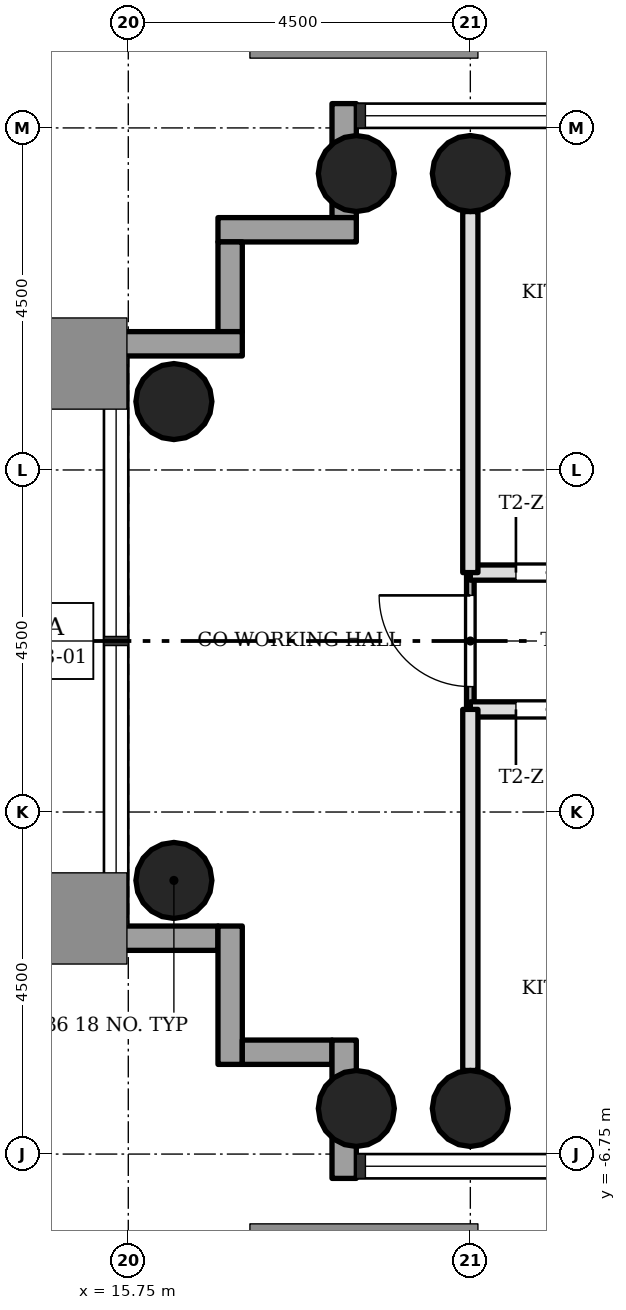
"""IFC4 building model, lengths in metres.
Left out: names, types, materials, properties, quantities, classifications, styles, units other than length and angle.
Written with IfcOpenShell. Run it as: python <this file> out.ifc"""

import sys

from ifc_helpers import new_model, si_unit, direction, frame, frame_2d, origin, origin_2d, place, context, subcontext, project, spatial, rectangle, hollow_circle, extrude, element, fill, save


model = new_model("IFC4")
c1 = context("Model", 3, precision=1e-05, world=origin(), true_north=direction((0.0, 1.0)))
c2 = subcontext(c1, "Body", "Model", "MODEL_VIEW")
j1 = project(units=[si_unit("LENGTHUNIT", "METRE"), si_unit("PLANEANGLEUNIT", "RADIAN")], contexts=[c1])
p1 = place(None, origin())
s1 = spatial("IfcSite", under=j1, at=p1, CompositionType="ELEMENT")
p2 = place(p1, origin())
s2 = spatial("IfcBuilding", under=s1, at=p2, CompositionType="ELEMENT")
p3 = place(p2, frame((0.0, 0.0, 38.1)))
s3 = spatial("IfcBuildingStorey", under=s2, at=p3, CompositionType="ELEMENT", Elevation=38.1)
for number, where, z_axis, x_axis in (
    (1, (20.25, 6.15, 0.0), (0.0, 0.0, 1.0), (1.0, 0.0, 0.0)),
    (2, (20.25, -6.15, 0.0), (0.0, 0.0, 1.0), (1.0, 0.0, 0.0)),
    (3, (18.75, 6.15, 0.0), (0.0, 0.0, 1.0), (1.0, 0.0, 0.0)),
    (4, (18.75, -6.15, 0.0), (0.0, 0.0, 1.0), (1.0, 0.0, 0.0)),
    (5, (16.35, 3.15, 0.0), (0.0, 0.0, 1.0), (1.0, 0.0, 0.0)),
    (6, (16.35, -3.15, 0.0), (0.0, 0.0, 1.0), (1.0, 0.0, 0.0)),
):
    element("IfcColumn", number, at=place(p3, frame(where, z_axis=z_axis, x_axis=x_axis)), inside=s3, PredefinedType="COLUMN", context=c2, shape_type="SweptSolid", body=[
        extrude(hollow_circle(Radius=0.5, WallThickness=0.036, at=origin_2d()), origin(), (0.0, 0.0, 1.0), 3.4),
    ])
p4 = place(p3, frame((18.59, 7.07, -0.3), z_axis=(0.0, 0.0, 1.0), x_axis=(0.0, -1.0, 0.0)))
e7 = element("IfcWall", 7, at=p4, inside=s3, PredefinedType="STANDARD", context=c2, shape_type="SweptSolid", body=[
    extrude(rectangle(XDim=1.5, YDim=0.32, at=frame_2d((0.75, 0.0))), origin(), (0.0, 0.0, 1.0), 3.4),
])
p5 = place(p3, frame((18.75, 5.41, -0.3), z_axis=(0.0, 0.0, 1.0), x_axis=(-1.0, 0.0, 0.0)))
e8 = element("IfcWall", 8, at=p5, inside=s3, PredefinedType="STANDARD", context=c2, shape_type="SweptSolid", body=[
    extrude(rectangle(XDim=1.82, YDim=0.32, at=frame_2d((0.91, 0.0))), origin(), (0.0, 0.0, 1.0), 3.4),
])
p6 = place(p3, frame((17.09, 5.25, -0.3), z_axis=(0.0, 0.0, 1.0), x_axis=(0.0, -1.0, 0.0)))
e9 = element("IfcWall", 9, at=p6, inside=s3, PredefinedType="STANDARD", context=c2, shape_type="SweptSolid", body=[
    extrude(rectangle(XDim=1.18, YDim=0.32, at=frame_2d((0.59, 0.0))), origin(), (0.0, 0.0, 1.0), 3.4),
])
p7 = place(p3, frame((17.25, 3.91, -0.3), z_axis=(0.0, 0.0, 1.0), x_axis=(-1.0, 0.0, 0.0)))
e10 = element("IfcWall", 10, at=p7, inside=s3, PredefinedType="STANDARD", context=c2, shape_type="SweptSolid", body=[
    extrude(rectangle(XDim=1.82, YDim=0.32, at=frame_2d((0.91, 0.0))), origin(), (0.0, 0.0, 1.0), 3.4),
])
p8 = place(p3, frame((15.43, -3.91, -0.3), z_axis=(0.0, 0.0, 1.0), x_axis=(1.0, 0.0, 0.0)))
e11 = element("IfcWall", 11, at=p8, inside=s3, PredefinedType="STANDARD", context=c2, shape_type="SweptSolid", body=[
    extrude(rectangle(XDim=1.5, YDim=0.32, at=frame_2d((0.75, 0.0))), origin(), (0.0, 0.0, 1.0), 3.4),
])
p9 = place(p3, frame((17.09, -3.75, -0.3), z_axis=(0.0, 0.0, 1.0), x_axis=(0.0, -1.0, 0.0)))
e12 = element("IfcWall", 12, at=p9, inside=s3, PredefinedType="STANDARD", context=c2, shape_type="SweptSolid", body=[
    extrude(rectangle(XDim=1.82, YDim=0.32, at=frame_2d((0.91, 0.0))), origin(), (0.0, 0.0, 1.0), 3.4),
])
p10 = place(p3, frame((17.25, -5.41, -0.3), z_axis=(0.0, 0.0, 1.0), x_axis=(1.0, 0.0, 0.0)))
e13 = element("IfcWall", 13, at=p10, inside=s3, PredefinedType="STANDARD", context=c2, shape_type="SweptSolid", body=[
    extrude(rectangle(XDim=1.18, YDim=0.32, at=frame_2d((0.59, 0.0))), origin(), (0.0, 0.0, 1.0), 3.4),
])
p11 = place(p3, frame((18.59, -5.25, -0.3), z_axis=(0.0, 0.0, 1.0), x_axis=(0.0, -1.0, 0.0)))
e14 = element("IfcWall", 14, at=p11, inside=s3, PredefinedType="STANDARD", context=c2, shape_type="SweptSolid", body=[
    extrude(rectangle(XDim=1.82, YDim=0.32, at=frame_2d((0.91, 0.0))), origin(), (0.0, 0.0, 1.0), 3.4),
])
p12 = place(p3, frame((24.75, -0.9, 0.0), z_axis=(0.0, 0.0, 1.0), x_axis=(-1.0, 0.0, 0.0)))
e15 = element("IfcWall", 15, at=p12, inside=s3, PredefinedType="SOLIDWALL", context=c2, shape_type="SweptSolid", body=[
    extrude(rectangle(XDim=4.5, YDim=0.2, at=frame_2d((2.25, 0.0))), origin(), (0.0, 0.0, 1.0), 3.0),
])
p13 = place(p12, frame((3.0, 0.0, 0.0)))
e16 = element("IfcOpeningElement", 16, at=p13, cuts=e15, PredefinedType="OPENING", context=c2, shape_type="SweptSolid", body=[
    extrude(rectangle(XDim=0.9, YDim=2.1, at=frame_2d((0.45, 1.05))), frame((0.0, 0.11, 0.0), z_axis=(0.0, -1.0, 0.0), x_axis=(1.0, 0.0, 0.0)), (0.0, 0.0, 1.0), 0.22),
])
p14 = place(p3, frame((24.75, 0.9, 0.0), z_axis=(0.0, 0.0, 1.0), x_axis=(-1.0, 0.0, 0.0)))
e17 = element("IfcWall", 17, at=p14, inside=s3, PredefinedType="SOLIDWALL", context=c2, shape_type="SweptSolid", body=[
    extrude(rectangle(XDim=4.5, YDim=0.2, at=frame_2d((2.25, 0.0))), origin(), (0.0, 0.0, 1.0), 3.0),
])
p15 = place(p14, frame((3.0, 0.0, 0.0)))
e18 = element("IfcOpeningElement", 18, at=p15, cuts=e17, PredefinedType="OPENING", context=c2, shape_type="SweptSolid", body=[
    extrude(rectangle(XDim=0.9, YDim=2.1, at=frame_2d((0.45, 1.05))), frame((0.0, 0.11, 0.0), z_axis=(0.0, -1.0, 0.0), x_axis=(1.0, 0.0, 0.0)), (0.0, 0.0, 1.0), 0.22),
])
p16 = place(p3, frame((20.25, -0.9, 0.0), z_axis=(0.0, 0.0, 1.0), x_axis=(0.0, 1.0, 0.0)))
e19 = element("IfcWall", 19, at=p16, inside=s3, PredefinedType="PARTITIONING", context=c2, shape_type="SweptSolid", body=[
    extrude(rectangle(XDim=1.8, YDim=0.1, at=frame_2d((0.9, 0.0))), origin(), (0.0, 0.0, 1.0), 3.0),
])
p17 = place(p16, frame((0.3, 0.0, 0.0)))
e20 = element("IfcOpeningElement", 20, at=p17, cuts=e19, PredefinedType="OPENING", context=c2, shape_type="SweptSolid", body=[
    extrude(rectangle(XDim=1.2, YDim=2.1, at=frame_2d((0.6, 1.05))), frame((0.0, 0.06, 0.0), z_axis=(0.0, -1.0, 0.0), x_axis=(1.0, 0.0, 0.0)), (0.0, 0.0, 1.0), 0.12),
])
for number, where, z_axis, x_axis in (
    (21, (20.25, -5.65, 0.0), (0.0, 0.0, 1.0), (0.0, 1.0, 0.0)),
    (22, (20.25, 0.9, 0.0), (0.0, 0.0, 1.0), (0.0, 1.0, 0.0)),
):
    element("IfcWall", number, at=place(p3, frame(where, z_axis=z_axis, x_axis=x_axis)), inside=s3, PredefinedType="SOLIDWALL", context=c2, shape_type="SweptSolid", body=[
        extrude(rectangle(XDim=4.75, YDim=0.2, at=frame_2d((2.375, 0.0))), origin(), (0.0, 0.0, 1.0), 3.0),
    ])
p18 = place(p13, origin())
e23 = element("IfcDoor", 23, at=p18, inside=s3, OperationType="SINGLE_SWING_LEFT", PredefinedType="DOOR", context=c2, shape_type="SweptSolid", body=[
    extrude(rectangle(XDim=0.9, YDim=2.1, at=frame_2d((0.45, 1.05))), frame((0.0, 0.025, 0.0), z_axis=(0.0, -1.0, 0.0), x_axis=(1.0, 0.0, 0.0)), (0.0, 0.0, 1.0), 0.05),
])
fill(e16, e23)
p19 = place(p15, origin())
e24 = element("IfcDoor", 24, at=p19, inside=s3, OperationType="SINGLE_SWING_RIGHT", PredefinedType="DOOR", context=c2, shape_type="SweptSolid", body=[
    extrude(rectangle(XDim=0.9, YDim=2.1, at=frame_2d((0.45, 1.05))), frame((0.0, 0.025, 0.0), z_axis=(0.0, -1.0, 0.0), x_axis=(1.0, 0.0, 0.0)), (0.0, 0.0, 1.0), 0.05),
])
fill(e18, e24)
p20 = place(p17, origin())
e25 = element("IfcDoor", 25, at=p20, inside=s3, OperationType="SINGLE_SWING_LEFT", PredefinedType="DOOR", context=c2, shape_type="SweptSolid", body=[
    extrude(rectangle(XDim=1.2, YDim=2.1, at=frame_2d((0.6, 1.05))), frame((0.0, 0.025, 0.0), z_axis=(0.0, -1.0, 0.0), x_axis=(1.0, 0.0, 0.0)), (0.0, 0.0, 1.0), 0.05),
])
fill(e20, e25)
save(model, sys.argv[1])
